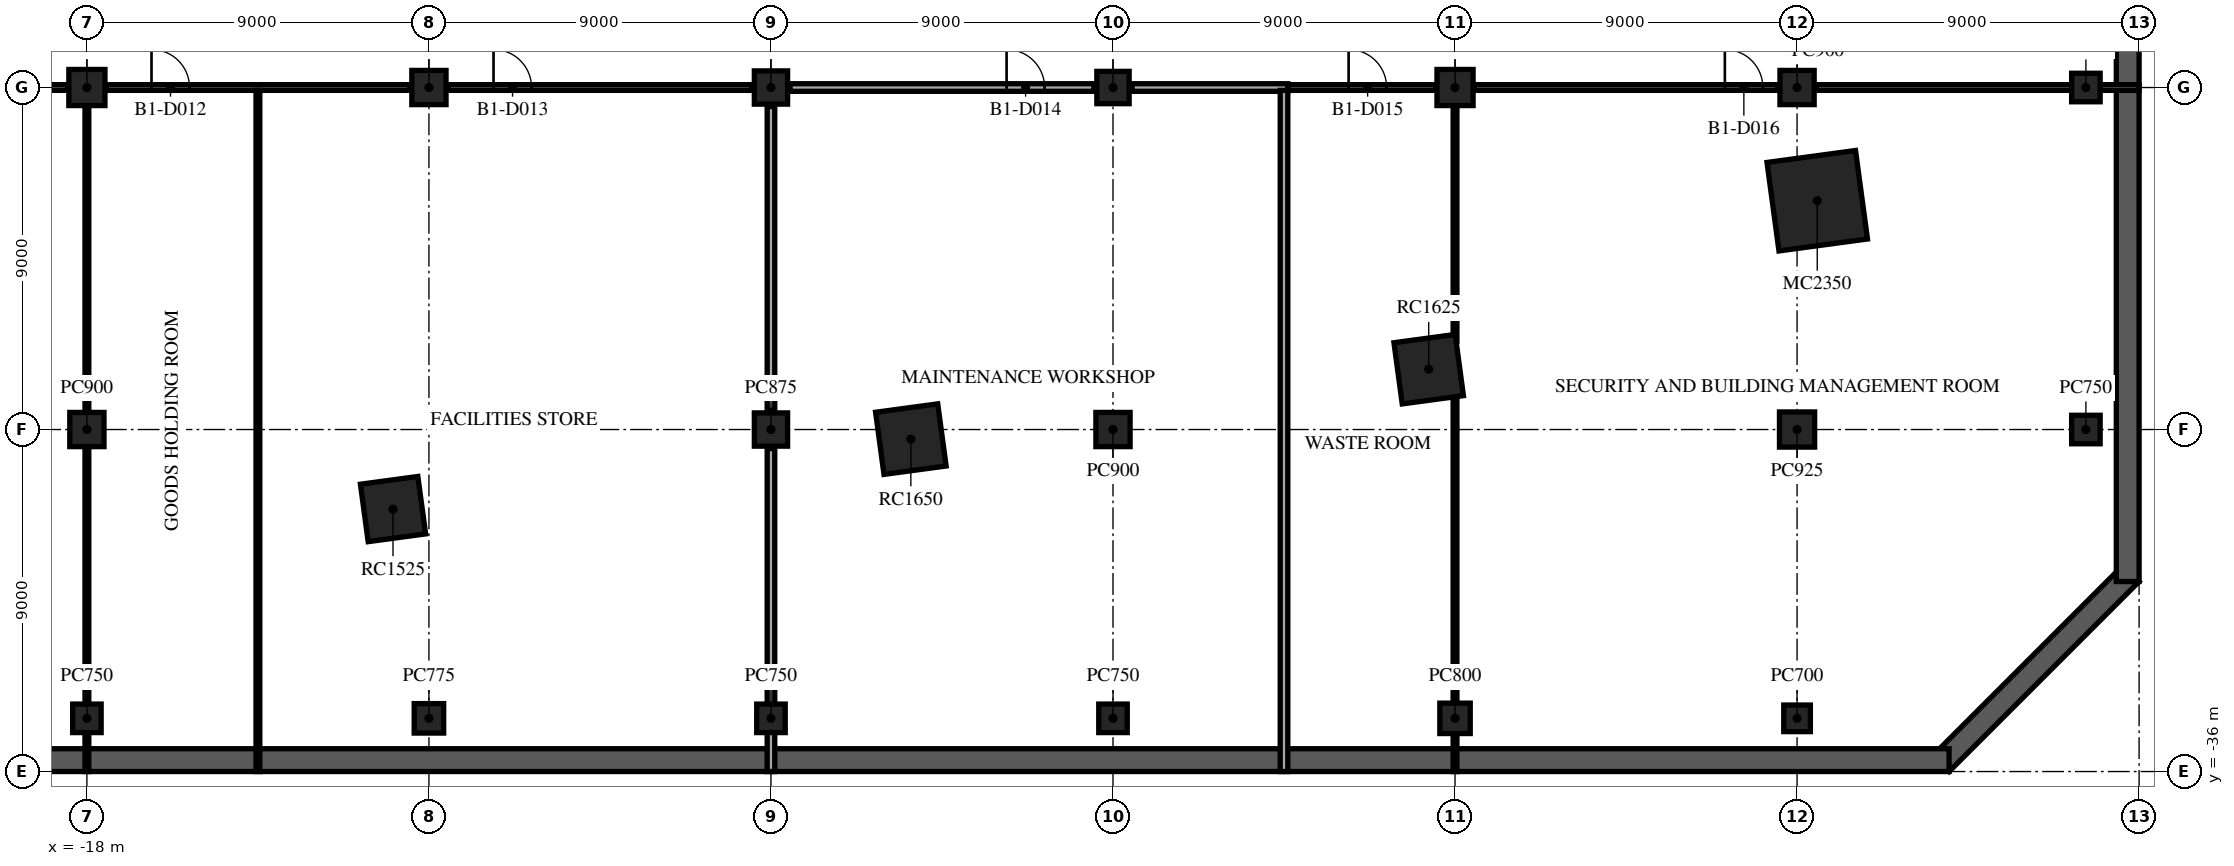
"""IFC4 building model, lengths in metres.
Left out: names, types, materials, properties, quantities, classifications, styles, units other than length and angle.
Written with IfcOpenShell. Run it as: python <this file> out.ifc"""

import sys

from ifc_helpers import new_model, si_unit, direction, frame, frame_2d, origin, origin_2d, place, context, subcontext, project, spatial, rectangle, extrude, element, fill, save


model = new_model("IFC4")
c1 = context("Model", 3, precision=1e-05, world=origin(), true_north=direction((0.0, 1.0)))
c2 = subcontext(c1, "Body", "Model", "MODEL_VIEW")
j1 = project(units=[si_unit("LENGTHUNIT", "METRE"), si_unit("PLANEANGLEUNIT", "RADIAN")], contexts=[c1])
p1 = place(None, origin())
s1 = spatial("IfcSite", under=j1, at=p1, CompositionType="ELEMENT")
p2 = place(p1, origin())
s2 = spatial("IfcBuilding", under=s1, at=p2, CompositionType="ELEMENT")
p3 = place(p2, frame((0.0, 0.0, -4.5)))
s3 = spatial("IfcBuildingStorey", under=s2, at=p3, CompositionType="ELEMENT", Elevation=-4.5)
p4 = place(p3, frame((30.788, -35.788, -0.3), z_axis=(0.0, 0.0, 1.0), x_axis=(0.707106781187, 0.707106781187, 0.0)))
e1 = element("IfcWall", 1, at=p4, inside=s3, PredefinedType="SOLIDWALL", context=c2, shape_type="SweptSolid", body=[
    extrude(rectangle(XDim=7.071, YDim=0.6, at=frame_2d((3.536, 0.0))), origin(), (0.0, 0.0, 1.0), 4.4),
])
for number, where, z_axis, x_axis in (
    (2, (35.7, -31.0, -0.3), (0.0, 0.0, 1.0), (0.0, 1.0, 0.0)),
    (3, (-31.0, -35.7, -0.3), (0.0, 0.0, 1.0), (1.0, 0.0, 0.0)),
):
    element("IfcWall", number, at=place(p3, frame(where, z_axis=z_axis, x_axis=x_axis)), inside=s3, PredefinedType="SOLIDWALL", context=c2, shape_type="SweptSolid", body=[
        extrude(rectangle(XDim=62.0, YDim=0.6, at=frame_2d((31.0, 0.0))), origin(), (0.0, 0.0, 1.0), 4.4),
    ])
p5 = place(p3, frame((-18.0, -34.6, 0.0), z_axis=(0.0, 0.0, 1.0), x_axis=(1.0, 0.0, 0.0)))
e4 = element("IfcColumn", 4, at=p5, inside=s3, PredefinedType="COLUMN", context=c2, shape_type="SweptSolid", body=[
    extrude(rectangle(XDim=0.75, YDim=0.75, at=origin_2d()), origin(), (0.0, 0.0, 1.0), 4.5),
])
p6 = place(p3, frame((-18.0, -27.0, 0.0), z_axis=(0.0, 0.0, 1.0), x_axis=(1.0, 0.0, 0.0)))
e5 = element("IfcColumn", 5, at=p6, inside=s3, PredefinedType="COLUMN", context=c2, shape_type="SweptSolid", body=[
    extrude(rectangle(XDim=0.9, YDim=0.9, at=origin_2d()), origin(), (0.0, 0.0, 1.0), 4.5),
])
p7 = place(p3, frame((-18.0, -18.0, 0.0), z_axis=(0.0, 0.0, 1.0), x_axis=(1.0, 0.0, 0.0)))
e6 = element("IfcColumn", 6, at=p7, inside=s3, PredefinedType="COLUMN", context=c2, shape_type="SweptSolid", body=[
    extrude(rectangle(XDim=0.95, YDim=0.95, at=origin_2d()), origin(), (0.0, 0.0, 1.0), 4.5),
])
p8 = place(p3, frame((-9.0, -34.6, 0.0), z_axis=(0.0, 0.0, 1.0), x_axis=(1.0, 0.0, 0.0)))
e7 = element("IfcColumn", 7, at=p8, inside=s3, PredefinedType="COLUMN", context=c2, shape_type="SweptSolid", body=[
    extrude(rectangle(XDim=0.775, YDim=0.775, at=origin_2d()), origin(), (0.0, 0.0, 1.0), 4.5),
])
p9 = place(p3, frame((-9.0, -18.0, 0.0), z_axis=(0.0, 0.0, 1.0), x_axis=(1.0, 0.0, 0.0)))
e8 = element("IfcColumn", 8, at=p9, inside=s3, PredefinedType="COLUMN", context=c2, shape_type="SweptSolid", body=[
    extrude(rectangle(XDim=0.9, YDim=0.9, at=origin_2d()), origin(), (0.0, 0.0, 1.0), 4.5),
])
p10 = place(p3, frame((0.0, -34.6, 0.0), z_axis=(0.0, 0.0, 1.0), x_axis=(1.0, 0.0, 0.0)))
e9 = element("IfcColumn", 9, at=p10, inside=s3, PredefinedType="COLUMN", context=c2, shape_type="SweptSolid", body=[
    extrude(rectangle(XDim=0.75, YDim=0.75, at=origin_2d()), origin(), (0.0, 0.0, 1.0), 4.5),
])
for number, where, z_axis, x_axis in (
    (10, (0.0, -27.0, 0.0), (0.0, 0.0, 1.0), (1.0, 0.0, 0.0)),
    (11, (0.0, -18.0, 0.0), (0.0, 0.0, 1.0), (1.0, 0.0, 0.0)),
):
    element("IfcColumn", number, at=place(p3, frame(where, z_axis=z_axis, x_axis=x_axis)), inside=s3, PredefinedType="COLUMN", context=c2, shape_type="SweptSolid", body=[
        extrude(rectangle(XDim=0.875, YDim=0.875, at=origin_2d()), origin(), (0.0, 0.0, 1.0), 4.5),
    ])
p11 = place(p3, frame((9.0, -34.6, 0.0), z_axis=(0.0, 0.0, 1.0), x_axis=(1.0, 0.0, 0.0)))
e12 = element("IfcColumn", 12, at=p11, inside=s3, PredefinedType="COLUMN", context=c2, shape_type="SweptSolid", body=[
    extrude(rectangle(XDim=0.75, YDim=0.75, at=origin_2d()), origin(), (0.0, 0.0, 1.0), 4.5),
])
p12 = place(p3, frame((9.0, -27.0, 0.0), z_axis=(0.0, 0.0, 1.0), x_axis=(1.0, 0.0, 0.0)))
e13 = element("IfcColumn", 13, at=p12, inside=s3, PredefinedType="COLUMN", context=c2, shape_type="SweptSolid", body=[
    extrude(rectangle(XDim=0.9, YDim=0.9, at=origin_2d()), origin(), (0.0, 0.0, 1.0), 4.5),
])
p13 = place(p3, frame((9.0, -18.0, 0.0), z_axis=(0.0, 0.0, 1.0), x_axis=(1.0, 0.0, 0.0)))
e14 = element("IfcColumn", 14, at=p13, inside=s3, PredefinedType="COLUMN", context=c2, shape_type="SweptSolid", body=[
    extrude(rectangle(XDim=0.85, YDim=0.85, at=origin_2d()), origin(), (0.0, 0.0, 1.0), 4.5),
])
p14 = place(p3, frame((18.0, -34.6, 0.0), z_axis=(0.0, 0.0, 1.0), x_axis=(1.0, 0.0, 0.0)))
e15 = element("IfcColumn", 15, at=p14, inside=s3, PredefinedType="COLUMN", context=c2, shape_type="SweptSolid", body=[
    extrude(rectangle(XDim=0.8, YDim=0.8, at=origin_2d()), origin(), (0.0, 0.0, 1.0), 4.5),
])
p15 = place(p3, frame((18.0, -18.0, 0.0), z_axis=(0.0, 0.0, 1.0), x_axis=(1.0, 0.0, 0.0)))
e16 = element("IfcColumn", 16, at=p15, inside=s3, PredefinedType="COLUMN", context=c2, shape_type="SweptSolid", body=[
    extrude(rectangle(XDim=0.95, YDim=0.95, at=origin_2d()), origin(), (0.0, 0.0, 1.0), 4.5),
])
p16 = place(p3, frame((27.0, -34.6, 0.0), z_axis=(0.0, 0.0, 1.0), x_axis=(1.0, 0.0, 0.0)))
e17 = element("IfcColumn", 17, at=p16, inside=s3, PredefinedType="COLUMN", context=c2, shape_type="SweptSolid", body=[
    extrude(rectangle(XDim=0.7, YDim=0.7, at=origin_2d()), origin(), (0.0, 0.0, 1.0), 4.5),
])
p17 = place(p3, frame((27.0, -27.0, 0.0), z_axis=(0.0, 0.0, 1.0), x_axis=(1.0, 0.0, 0.0)))
e18 = element("IfcColumn", 18, at=p17, inside=s3, PredefinedType="COLUMN", context=c2, shape_type="SweptSolid", body=[
    extrude(rectangle(XDim=0.925, YDim=0.925, at=origin_2d()), origin(), (0.0, 0.0, 1.0), 4.5),
])
p18 = place(p3, frame((27.0, -18.0, 0.0), z_axis=(0.0, 0.0, 1.0), x_axis=(1.0, 0.0, 0.0)))
e19 = element("IfcColumn", 19, at=p18, inside=s3, PredefinedType="COLUMN", context=c2, shape_type="SweptSolid", body=[
    extrude(rectangle(XDim=0.9, YDim=0.9, at=origin_2d()), origin(), (0.0, 0.0, 1.0), 4.5),
])
for number, where, z_axis, x_axis in (
    (20, (34.6, -27.0, 0.0), (0.0, 0.0, 1.0), (1.0, 0.0, 0.0)),
    (21, (34.6, -18.0, 0.0), (0.0, 0.0, 1.0), (1.0, 0.0, 0.0)),
):
    element("IfcColumn", number, at=place(p3, frame(where, z_axis=z_axis, x_axis=x_axis)), inside=s3, PredefinedType="COLUMN", context=c2, shape_type="SweptSolid", body=[
        extrude(rectangle(XDim=0.75, YDim=0.75, at=origin_2d()), origin(), (0.0, 0.0, 1.0), 4.5),
    ])
p19 = place(p3, frame((-9.945, -29.093, 0.0), z_axis=(0.0, 0.0, 1.0), x_axis=(0.991001197216, 0.133853005627, 0.0)))
e22 = element("IfcColumn", 22, at=p19, inside=s3, PredefinedType="COLUMN", context=c2, shape_type="SweptSolid", body=[
    extrude(rectangle(XDim=1.525, YDim=1.525, at=origin_2d()), origin(), (0.0, 0.0, 1.0), 4.5),
])
p20 = place(p3, frame((3.681, -27.253, 0.0), z_axis=(0.0, 0.0, 1.0), x_axis=(0.991001197216, 0.133853005627, 0.0)))
e23 = element("IfcColumn", 23, at=p20, inside=s3, PredefinedType="COLUMN", context=c2, shape_type="SweptSolid", body=[
    extrude(rectangle(XDim=1.65, YDim=1.65, at=origin_2d()), origin(), (0.0, 0.0, 1.0), 4.5),
])
p21 = place(p3, frame((17.307, -25.412, 0.0), z_axis=(0.0, 0.0, 1.0), x_axis=(0.991001197216, 0.133853005627, 0.0)))
e24 = element("IfcColumn", 24, at=p21, inside=s3, PredefinedType="COLUMN", context=c2, shape_type="SweptSolid", body=[
    extrude(rectangle(XDim=1.625, YDim=1.625, at=origin_2d()), origin(), (0.0, 0.0, 1.0), 4.5),
])
p22 = place(p3, frame((27.531, -20.979, 0.0), z_axis=(0.0, 0.0, 1.0), x_axis=(0.991001197216, 0.133853005627, 0.0)))
e25 = element("IfcColumn", 25, at=p22, inside=s3, PredefinedType="COLUMN", context=c2, shape_type="SweptSolid", body=[
    extrude(rectangle(XDim=2.35, YDim=2.35, at=origin_2d()), origin(), (0.0, 0.0, 1.0), 4.5),
])
p23 = place(p3, frame((-24.681, -18.0, 0.0), z_axis=(0.0, 0.0, 1.0), x_axis=(1.0, 0.0, 0.0)))
e26 = element("IfcWall", 26, at=p23, inside=s3, PredefinedType="PARTITIONING", context=c2, shape_type="SweptSolid", body=[
    extrude(rectangle(XDim=6.181, YDim=0.15, at=frame_2d((3.09, 0.0))), origin(), (0.0, 0.0, 1.0), 4.1),
])
p24 = place(p3, frame((-17.5, -18.0, 0.0), z_axis=(0.0, 0.0, 1.0), x_axis=(1.0, 0.0, 0.0)))
e27 = element("IfcWall", 27, at=p24, inside=s3, PredefinedType="PARTITIONING", context=c2, shape_type="SweptSolid", body=[
    extrude(rectangle(XDim=8.0, YDim=0.15, at=frame_2d((4.0, 0.0))), origin(), (0.0, 0.0, 1.0), 4.1),
])
p25 = place(p24, frame((1.2, 0.0, 0.0)))
e28 = element("IfcOpeningElement", 28, at=p25, cuts=e27, PredefinedType="OPENING", context=c2, shape_type="SweptSolid", body=[
    extrude(rectangle(XDim=1.0, YDim=2.1, at=frame_2d((0.5, 1.05))), frame((0.0, 0.085, 0.0), z_axis=(0.0, -1.0, 0.0), x_axis=(1.0, 0.0, 0.0)), (0.0, 0.0, 1.0), 0.17),
])
p26 = place(p3, frame((-8.5, -18.0, 0.0), z_axis=(0.0, 0.0, 1.0), x_axis=(1.0, 0.0, 0.0)))
e29 = element("IfcWall", 29, at=p26, inside=s3, PredefinedType="PARTITIONING", context=c2, shape_type="SweptSolid", body=[
    extrude(rectangle(XDim=8.0, YDim=0.15, at=frame_2d((4.0, 0.0))), origin(), (0.0, 0.0, 1.0), 4.1),
])
p27 = place(p26, frame((1.2, 0.0, 0.0)))
e30 = element("IfcOpeningElement", 30, at=p27, cuts=e29, PredefinedType="OPENING", context=c2, shape_type="SweptSolid", body=[
    extrude(rectangle(XDim=1.0, YDim=2.1, at=frame_2d((0.5, 1.05))), frame((0.0, 0.085, 0.0), z_axis=(0.0, -1.0, 0.0), x_axis=(1.0, 0.0, 0.0)), (0.0, 0.0, 1.0), 0.17),
])
p28 = place(p3, frame((0.5, -18.0, 0.0), z_axis=(0.0, 0.0, 1.0), x_axis=(1.0, 0.0, 0.0)))
e31 = element("IfcWall", 31, at=p28, inside=s3, PredefinedType="PARTITIONING", context=c2, shape_type="SweptSolid", body=[
    extrude(rectangle(XDim=8.0, YDim=0.2, at=frame_2d((4.0, 0.0))), origin(), (0.0, 0.0, 1.0), 4.1),
])
p29 = place(p28, frame((5.7, 0.0, 0.0)))
e32 = element("IfcOpeningElement", 32, at=p29, cuts=e31, PredefinedType="OPENING", context=c2, shape_type="SweptSolid", body=[
    extrude(rectangle(XDim=1.0, YDim=2.1, at=frame_2d((0.5, 1.05))), frame((0.0, 0.11, 0.0), z_axis=(0.0, -1.0, 0.0), x_axis=(1.0, 0.0, 0.0)), (0.0, 0.0, 1.0), 0.22),
])
p30 = place(p3, frame((9.5, -18.0, 0.0), z_axis=(0.0, 0.0, 1.0), x_axis=(1.0, 0.0, 0.0)))
e33 = element("IfcWall", 33, at=p30, inside=s3, PredefinedType="PARTITIONING", context=c2, shape_type="SweptSolid", body=[
    extrude(rectangle(XDim=4.1, YDim=0.2, at=frame_2d((2.05, 0.0))), origin(), (0.0, 0.0, 1.0), 4.1),
])
p31 = place(p3, frame((13.6, -18.0, 0.0), z_axis=(0.0, 0.0, 1.0), x_axis=(1.0, 0.0, 0.0)))
e34 = element("IfcWall", 34, at=p31, inside=s3, PredefinedType="PARTITIONING", context=c2, shape_type="SweptSolid", body=[
    extrude(rectangle(XDim=3.9, YDim=0.15, at=frame_2d((1.95, 0.0))), origin(), (0.0, 0.0, 1.0), 4.1),
])
p32 = place(p31, frame((1.6, 0.0, 0.0)))
e35 = element("IfcOpeningElement", 35, at=p32, cuts=e34, PredefinedType="OPENING", context=c2, shape_type="SweptSolid", body=[
    extrude(rectangle(XDim=1.0, YDim=2.1, at=frame_2d((0.5, 1.05))), frame((0.0, 0.085, 0.0), z_axis=(0.0, -1.0, 0.0), x_axis=(1.0, 0.0, 0.0)), (0.0, 0.0, 1.0), 0.17),
])
p33 = place(p3, frame((18.5, -18.0, 0.0), z_axis=(0.0, 0.0, 1.0), x_axis=(1.0, 0.0, 0.0)))
e36 = element("IfcWall", 36, at=p33, inside=s3, PredefinedType="PARTITIONING", context=c2, shape_type="SweptSolid", body=[
    extrude(rectangle(XDim=8.0, YDim=0.15, at=frame_2d((4.0, 0.0))), origin(), (0.0, 0.0, 1.0), 4.1),
])
p34 = place(p33, frame((6.6, 0.0, 0.0)))
e37 = element("IfcOpeningElement", 37, at=p34, cuts=e36, PredefinedType="OPENING", context=c2, shape_type="SweptSolid", body=[
    extrude(rectangle(XDim=1.0, YDim=2.1, at=frame_2d((0.5, 1.05))), frame((0.0, 0.085, 0.0), z_axis=(0.0, -1.0, 0.0), x_axis=(1.0, 0.0, 0.0)), (0.0, 0.0, 1.0), 0.17),
])
p35 = place(p3, frame((27.5, -18.0, 0.0), z_axis=(0.0, 0.0, 1.0), x_axis=(1.0, 0.0, 0.0)))
e38 = element("IfcWall", 38, at=p35, inside=s3, PredefinedType="PARTITIONING", context=c2, shape_type="SweptSolid", body=[
    extrude(rectangle(XDim=8.5, YDim=0.15, at=frame_2d((4.25, 0.0))), origin(), (0.0, 0.0, 1.0), 4.1),
])
p36 = place(p3, frame((-18.0, -36.0, 0.0), z_axis=(0.0, 0.0, 1.0), x_axis=(0.0, 1.0, 0.0)))
e39 = element("IfcWall", 39, at=p36, inside=s3, PredefinedType="PARTITIONING", context=c2, shape_type="SweptSolid", body=[
    extrude(rectangle(XDim=8.5, YDim=0.1, at=frame_2d((4.25, 0.0))), origin(), (0.0, 0.0, 1.0), 4.1),
])
p37 = place(p3, frame((-18.0, -26.5, 0.0), z_axis=(0.0, 0.0, 1.0), x_axis=(0.0, 1.0, 0.0)))
e40 = element("IfcWall", 40, at=p37, inside=s3, PredefinedType="PARTITIONING", context=c2, shape_type="SweptSolid", body=[
    extrude(rectangle(XDim=8.0, YDim=0.1, at=frame_2d((4.0, 0.0))), origin(), (0.0, 0.0, 1.0), 4.1),
])
p38 = place(p3, frame((-13.5, -36.0, 0.0), z_axis=(0.0, 0.0, 1.0), x_axis=(0.0, 1.0, 0.0)))
e41 = element("IfcWall", 41, at=p38, inside=s3, PredefinedType="PARTITIONING", context=c2, shape_type="SweptSolid", body=[
    extrude(rectangle(XDim=17.925, YDim=0.1, at=frame_2d((8.962, 0.0))), origin(), (0.0, 0.0, 1.0), 4.1),
])
p39 = place(p3, frame((0.0, -36.0, 0.0), z_axis=(0.0, 0.0, 1.0), x_axis=(0.0, 1.0, 0.0)))
e42 = element("IfcWall", 42, at=p39, inside=s3, PredefinedType="PARTITIONING", context=c2, shape_type="SweptSolid", body=[
    extrude(rectangle(XDim=8.5, YDim=0.2, at=frame_2d((4.25, 0.0))), origin(), (0.0, 0.0, 1.0), 4.1),
])
p40 = place(p3, frame((0.0, -26.5, 0.0), z_axis=(0.0, 0.0, 1.0), x_axis=(0.0, 1.0, 0.0)))
e43 = element("IfcWall", 43, at=p40, inside=s3, PredefinedType="PARTITIONING", context=c2, shape_type="SweptSolid", body=[
    extrude(rectangle(XDim=8.0, YDim=0.2, at=frame_2d((4.0, 0.0))), origin(), (0.0, 0.0, 1.0), 4.1),
])
p41 = place(p3, frame((13.5, -36.0, 0.0), z_axis=(0.0, 0.0, 1.0), x_axis=(0.0, 1.0, 0.0)))
e44 = element("IfcWall", 44, at=p41, inside=s3, PredefinedType="PARTITIONING", context=c2, shape_type="SweptSolid", body=[
    extrude(rectangle(XDim=17.925, YDim=0.2, at=frame_2d((8.962, 0.0))), origin(), (0.0, 0.0, 1.0), 4.1),
])
p42 = place(p3, frame((18.0, -36.0, 0.0), z_axis=(0.0, 0.0, 1.0), x_axis=(0.0, 1.0, 0.0)))
e45 = element("IfcWall", 45, at=p42, inside=s3, PredefinedType="PARTITIONING", context=c2, shape_type="SweptSolid", body=[
    extrude(rectangle(XDim=9.857, YDim=0.1, at=frame_2d((4.928, 0.0))), origin(), (0.0, 0.0, 1.0), 4.1),
])
p43 = place(p3, frame((18.0, -24.681, 0.0), z_axis=(0.0, 0.0, 1.0), x_axis=(0.0, 1.0, 0.0)))
e46 = element("IfcWall", 46, at=p43, inside=s3, PredefinedType="PARTITIONING", context=c2, shape_type="SweptSolid", body=[
    extrude(rectangle(XDim=6.181, YDim=0.1, at=frame_2d((3.09, 0.0))), origin(), (0.0, 0.0, 1.0), 4.1),
])
p44 = place(p25, origin())
e47 = element("IfcDoor", 47, at=p44, inside=s3, OperationType="SINGLE_SWING_RIGHT", PredefinedType="DOOR", context=c2, shape_type="SweptSolid", body=[
    extrude(rectangle(XDim=1.0, YDim=2.1, at=frame_2d((0.5, 1.05))), frame((0.0, 0.025, 0.0), z_axis=(0.0, -1.0, 0.0), x_axis=(1.0, 0.0, 0.0)), (0.0, 0.0, 1.0), 0.05),
])
fill(e28, e47)
p45 = place(p27, origin())
e48 = element("IfcDoor", 48, at=p45, inside=s3, OperationType="SINGLE_SWING_LEFT", PredefinedType="DOOR", context=c2, shape_type="SweptSolid", body=[
    extrude(rectangle(XDim=1.0, YDim=2.1, at=frame_2d((0.5, 1.05))), frame((0.0, 0.025, 0.0), z_axis=(0.0, -1.0, 0.0), x_axis=(1.0, 0.0, 0.0)), (0.0, 0.0, 1.0), 0.05),
])
fill(e30, e48)
p46 = place(p29, origin())
e49 = element("IfcDoor", 49, at=p46, inside=s3, OperationType="SINGLE_SWING_RIGHT", PredefinedType="DOOR", context=c2, shape_type="SweptSolid", body=[
    extrude(rectangle(XDim=1.0, YDim=2.1, at=frame_2d((0.5, 1.05))), frame((0.0, 0.025, 0.0), z_axis=(0.0, -1.0, 0.0), x_axis=(1.0, 0.0, 0.0)), (0.0, 0.0, 1.0), 0.05),
])
fill(e32, e49)
p47 = place(p32, origin())
e50 = element("IfcDoor", 50, at=p47, inside=s3, OperationType="SINGLE_SWING_LEFT", PredefinedType="DOOR", context=c2, shape_type="SweptSolid", body=[
    extrude(rectangle(XDim=1.0, YDim=2.1, at=frame_2d((0.5, 1.05))), frame((0.0, 0.025, 0.0), z_axis=(0.0, -1.0, 0.0), x_axis=(1.0, 0.0, 0.0)), (0.0, 0.0, 1.0), 0.05),
])
fill(e35, e50)
p48 = place(p34, origin())
e51 = element("IfcDoor", 51, at=p48, inside=s3, OperationType="SINGLE_SWING_RIGHT", PredefinedType="DOOR", context=c2, shape_type="SweptSolid", body=[
    extrude(rectangle(XDim=1.0, YDim=2.1, at=frame_2d((0.5, 1.05))), frame((0.0, 0.025, 0.0), z_axis=(0.0, -1.0, 0.0), x_axis=(1.0, 0.0, 0.0)), (0.0, 0.0, 1.0), 0.05),
])
fill(e37, e51)
save(model, sys.argv[1])
